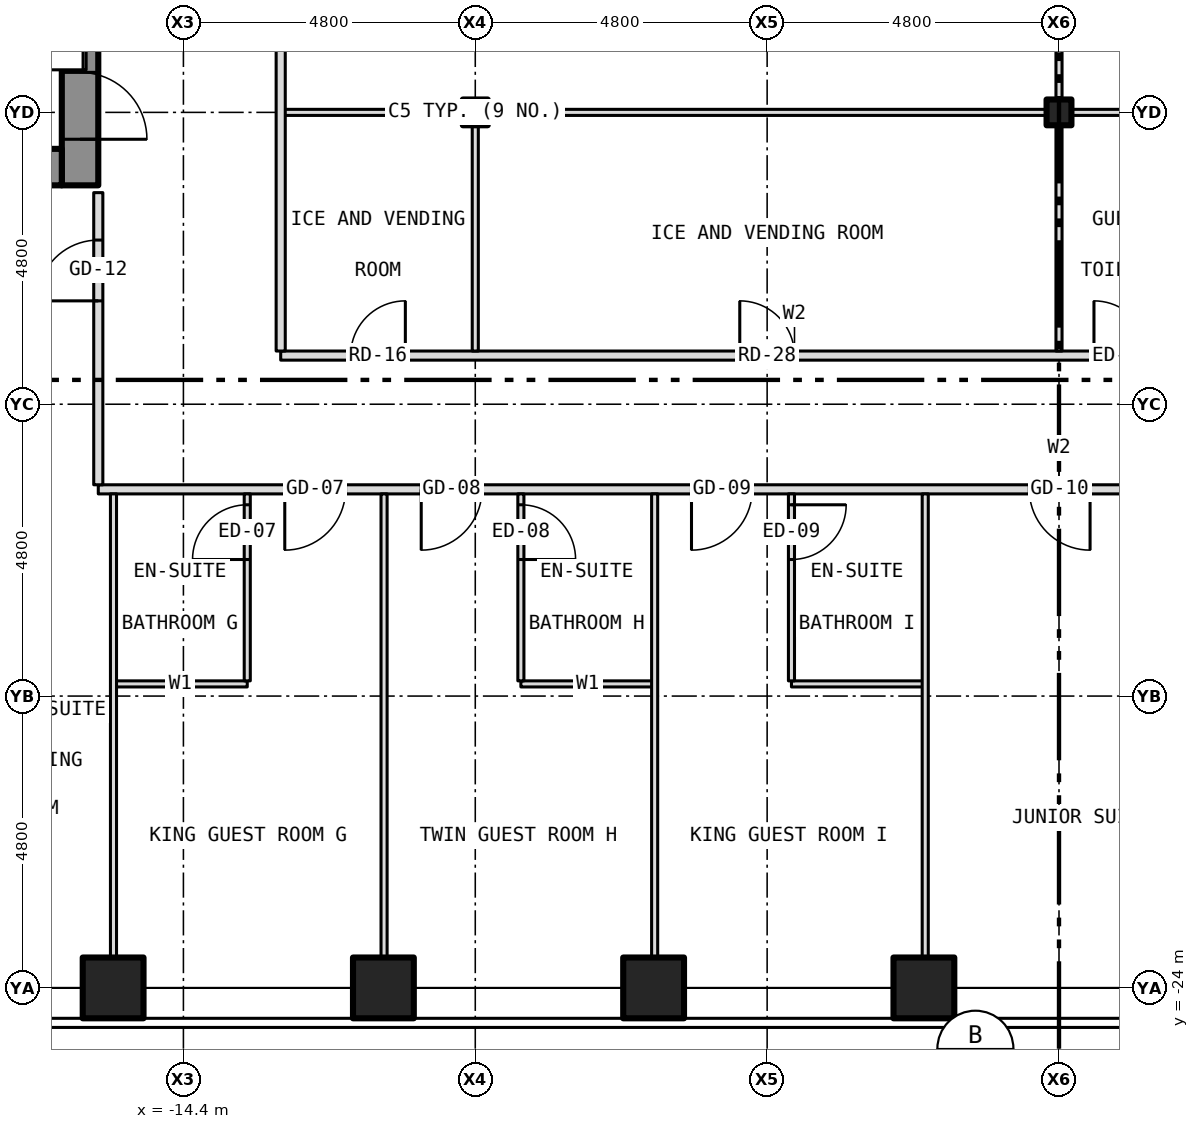
"""IFC4 building model, lengths in metres.
Left out: names, types, materials, properties, quantities, classifications, styles, units other than length and angle.
Written with IfcOpenShell. Run it as: python <this file> out.ifc"""

import sys

from ifc_helpers import new_model, si_unit, direction, frame, frame_2d, origin, origin_2d, place, context, subcontext, project, spatial, rectangle, hollow_rectangle, i_section, extrude, element, fill, save


model = new_model("IFC4")
c1 = context("Model", 3, precision=1e-05, world=origin(), true_north=direction((0.0, 1.0)))
c2 = subcontext(c1, "Body", "Model", "MODEL_VIEW")
j1 = project(units=[si_unit("LENGTHUNIT", "METRE"), si_unit("PLANEANGLEUNIT", "RADIAN")], contexts=[c1])
p1 = place(None, origin())
s1 = spatial("IfcSite", under=j1, at=p1, CompositionType="ELEMENT")
p2 = place(p1, origin())
s2 = spatial("IfcBuilding", under=s1, at=p2, CompositionType="ELEMENT")
p3 = place(p2, frame((0.0, 0.0, 53.0)))
s3 = spatial("IfcBuildingStorey", under=s2, at=p3, CompositionType="ELEMENT", Elevation=53.0)
for number, where, z_axis, x_axis in (
    (1, (-15.556, -24.0, -0.15), (0.0, 0.0, 1.0), (1.0, 0.0, 0.0)),
    (2, (-11.111, -24.0, -0.15), (0.0, 0.0, 1.0), (1.0, 0.0, 0.0)),
    (3, (-6.667, -24.0, -0.15), (0.0, 0.0, 1.0), (1.0, 0.0, 0.0)),
    (4, (-2.222, -24.0, -0.15), (0.0, 0.0, 1.0), (1.0, 0.0, 0.0)),
):
    element("IfcColumn", number, at=place(p3, frame(where, z_axis=z_axis, x_axis=x_axis)), inside=s3, PredefinedType="COLUMN", context=c2, shape_type="SweptSolid", body=[
        extrude(hollow_rectangle(XDim=1.0, YDim=1.0, WallThickness=0.06, at=origin_2d()), origin(), (0.0, 0.0, 1.0), 3.5),
    ])
for number, where, z_axis, x_axis in (
    (5, (-9.6, -9.6, -0.15), (0.0, 0.0, 1.0), (1.0, 0.0, 0.0)),
    (6, (0.0, -9.6, -0.15), (0.0, 0.0, 1.0), (1.0, 0.0, 0.0)),
):
    element("IfcColumn", number, at=place(p3, frame(where, z_axis=z_axis, x_axis=x_axis)), inside=s3, PredefinedType="COLUMN", context=c2, shape_type="SweptSolid", body=[
        extrude(i_section(OverallWidth=0.409, OverallDepth=0.424, WebThickness=0.033, FlangeThickness=0.052, at=origin_2d()), origin(), (0.0, 0.0, 1.0), 3.5),
    ])
p4 = place(p3, frame((-16.1, -10.8, 0.0), z_axis=(0.0, 0.0, 1.0), x_axis=(0.0, 1.0, 0.0)))
e7 = element("IfcWall", 7, at=p4, inside=s3, PredefinedType="SHEAR", context=c2, shape_type="SweptSolid", body=[
    extrude(rectangle(XDim=21.6, YDim=0.6, at=frame_2d((10.8, 0.0))), origin(), (0.0, 0.0, 1.0), 3.25),
])
p5 = place(p4, frame((9.4, 0.0, 0.0)))
e8 = element("IfcOpeningElement", 8, at=p5, cuts=e7, PredefinedType="OPENING", context=c2, shape_type="SweptSolid", body=[
    extrude(rectangle(XDim=1.1, YDim=2.1, at=frame_2d((0.55, 1.05))), frame((0.0, 0.312, 0.0), z_axis=(0.0, -1.0, 0.0), x_axis=(1.0, 0.0, 0.0)), (0.0, 0.0, 1.0), 0.624),
])
p6 = place(p4, frame((11.5, 0.0, 0.0)))
e9 = element("IfcOpeningElement", 9, at=p6, cuts=e7, PredefinedType="OPENING", context=c2, shape_type="SweptSolid", body=[
    extrude(rectangle(XDim=1.1, YDim=2.1, at=frame_2d((0.55, 1.05))), frame((0.0, 0.312, 0.0), z_axis=(0.0, -1.0, 0.0), x_axis=(1.0, 0.0, 0.0)), (0.0, 0.0, 1.0), 0.624),
])
p7 = place(p4, frame((13.6, 0.0, 0.0)))
e10 = element("IfcOpeningElement", 10, at=p7, cuts=e7, PredefinedType="OPENING", context=c2, shape_type="SweptSolid", body=[
    extrude(rectangle(XDim=1.1, YDim=2.1, at=frame_2d((0.55, 1.05))), frame((0.0, 0.312, 0.0), z_axis=(0.0, -1.0, 0.0), x_axis=(1.0, 0.0, 0.0)), (0.0, 0.0, 1.0), 0.624),
])
p8 = place(p4, frame((15.7, 0.0, 0.0)))
e11 = element("IfcOpeningElement", 11, at=p8, cuts=e7, PredefinedType="OPENING", context=c2, shape_type="SweptSolid", body=[
    extrude(rectangle(XDim=1.1, YDim=2.1, at=frame_2d((0.55, 1.05))), frame((0.0, 0.312, 0.0), z_axis=(0.0, -1.0, 0.0), x_axis=(1.0, 0.0, 0.0)), (0.0, 0.0, 1.0), 0.624),
])
p9 = place(p4, frame((17.8, 0.0, 0.0)))
e12 = element("IfcOpeningElement", 12, at=p9, cuts=e7, PredefinedType="OPENING", context=c2, shape_type="SweptSolid", body=[
    extrude(rectangle(XDim=1.1, YDim=2.1, at=frame_2d((0.55, 1.05))), frame((0.0, 0.312, 0.0), z_axis=(0.0, -1.0, 0.0), x_axis=(1.0, 0.0, 0.0)), (0.0, 0.0, 1.0), 0.624),
])
p10 = place(p4, frame((0.758, 0.0, 0.0)))
e13 = element("IfcOpeningElement", 13, at=p10, cuts=e7, PredefinedType="OPENING", context=c2, shape_type="SweptSolid", body=[
    extrude(rectangle(XDim=1.1, YDim=2.1, at=frame_2d((0.55, 1.05))), frame((0.0, 0.312, 0.0), z_axis=(0.0, -1.0, 0.0), x_axis=(1.0, 0.0, 0.0)), (0.0, 0.0, 1.0), 0.624),
])
p11 = place(p4, frame((7.5, 0.0, 0.0)))
e14 = element("IfcOpeningElement", 14, at=p11, cuts=e7, PredefinedType="OPENING", context=c2, shape_type="SweptSolid", body=[
    extrude(rectangle(XDim=1.1, YDim=2.1, at=frame_2d((0.55, 1.05))), frame((0.0, 0.312, 0.0), z_axis=(0.0, -1.0, 0.0), x_axis=(1.0, 0.0, 0.0)), (0.0, 0.0, 1.0), 0.624),
])
p12 = place(p3, frame((-23.4, -10.5, 0.0), z_axis=(0.0, 0.0, 1.0), x_axis=(1.0, 0.0, 0.0)))
e15 = element("IfcWall", 15, at=p12, inside=s3, PredefinedType="SHEAR", context=c2, shape_type="SweptSolid", body=[
    extrude(rectangle(XDim=7.0, YDim=0.6, at=frame_2d((3.5, 0.0))), origin(), (0.0, 0.0, 1.0), 3.25),
])
p13 = place(p3, frame((-15.55, -19.0, 0.0), z_axis=(0.0, 0.0, 1.0), x_axis=(1.0, 0.0, 0.0)))
e16 = element("IfcWall", 16, at=p13, inside=s3, PredefinedType="PARTITIONING", context=c2, shape_type="SweptSolid", body=[
    extrude(rectangle(XDim=2.2, YDim=0.1, at=frame_2d((1.1, 0.0))), origin(), (0.0, 0.0, 1.0), 3.35),
])
p14 = place(p3, frame((-8.85, -19.0, 0.0), z_axis=(0.0, 0.0, 1.0), x_axis=(1.0, 0.0, 0.0)))
e17 = element("IfcWall", 17, at=p14, inside=s3, PredefinedType="PARTITIONING", context=c2, shape_type="SweptSolid", body=[
    extrude(rectangle(XDim=2.2, YDim=0.1, at=frame_2d((1.1, 0.0))), origin(), (0.0, 0.0, 1.0), 3.35),
])
p15 = place(p3, frame((-4.4, -19.0, 0.0), z_axis=(0.0, 0.0, 1.0), x_axis=(1.0, 0.0, 0.0)))
e18 = element("IfcWall", 18, at=p15, inside=s3, PredefinedType="PARTITIONING", context=c2, shape_type="SweptSolid", body=[
    extrude(rectangle(XDim=2.2, YDim=0.1, at=frame_2d((1.1, 0.0))), origin(), (0.0, 0.0, 1.0), 3.35),
])
p16 = place(p3, frame((-15.8, -15.8, 0.0), z_axis=(0.0, 0.0, 1.0), x_axis=(1.0, 0.0, 0.0)))
e19 = element("IfcWall", 19, at=p16, inside=s3, PredefinedType="PARTITIONING", context=c2, shape_type="SweptSolid", body=[
    extrude(rectangle(XDim=31.6, YDim=0.15, at=frame_2d((15.8, 0.0))), origin(), (0.0, 0.0, 1.0), 3.35),
])
p17 = place(p16, frame((3.067, 0.0, 0.0)))
e20 = element("IfcOpeningElement", 20, at=p17, cuts=e19, PredefinedType="OPENING", context=c2, shape_type="SweptSolid", body=[
    extrude(rectangle(XDim=1.0, YDim=2.1, at=frame_2d((0.5, 1.05))), frame((0.0, 0.087, 0.0), z_axis=(0.0, -1.0, 0.0), x_axis=(1.0, 0.0, 0.0)), (0.0, 0.0, 1.0), 0.174),
])
p18 = place(p16, frame((5.311, 0.0, 0.0)))
e21 = element("IfcOpeningElement", 21, at=p18, cuts=e19, PredefinedType="OPENING", context=c2, shape_type="SweptSolid", body=[
    extrude(rectangle(XDim=1.0, YDim=2.1, at=frame_2d((0.5, 1.05))), frame((0.0, 0.087, 0.0), z_axis=(0.0, -1.0, 0.0), x_axis=(1.0, 0.0, 0.0)), (0.0, 0.0, 1.0), 0.174),
])
p19 = place(p16, frame((9.756, 0.0, 0.0)))
e22 = element("IfcOpeningElement", 22, at=p19, cuts=e19, PredefinedType="OPENING", context=c2, shape_type="SweptSolid", body=[
    extrude(rectangle(XDim=1.0, YDim=2.1, at=frame_2d((0.5, 1.05))), frame((0.0, 0.087, 0.0), z_axis=(0.0, -1.0, 0.0), x_axis=(1.0, 0.0, 0.0)), (0.0, 0.0, 1.0), 0.174),
])
p20 = place(p16, frame((15.311, 0.0, 0.0)))
e23 = element("IfcOpeningElement", 23, at=p20, cuts=e19, PredefinedType="OPENING", context=c2, shape_type="SweptSolid", body=[
    extrude(rectangle(XDim=1.0, YDim=2.1, at=frame_2d((0.5, 1.05))), frame((0.0, 0.087, 0.0), z_axis=(0.0, -1.0, 0.0), x_axis=(1.0, 0.0, 0.0)), (0.0, 0.0, 1.0), 0.174),
])
p21 = place(p16, frame((22.245, 0.0, 0.0)))
e24 = element("IfcOpeningElement", 24, at=p21, cuts=e19, PredefinedType="OPENING", context=c2, shape_type="SweptSolid", body=[
    extrude(rectangle(XDim=1.0, YDim=2.1, at=frame_2d((0.5, 1.05))), frame((0.0, 0.087, 0.0), z_axis=(0.0, -1.0, 0.0), x_axis=(1.0, 0.0, 0.0)), (0.0, 0.0, 1.0), 0.174),
])
p22 = place(p3, frame((-12.8, -13.6, 0.0), z_axis=(0.0, 0.0, 1.0), x_axis=(1.0, 0.0, 0.0)))
e25 = element("IfcWall", 25, at=p22, inside=s3, PredefinedType="PARTITIONING", context=c2, shape_type="SweptSolid", body=[
    extrude(rectangle(XDim=16.9, YDim=0.15, at=frame_2d((8.45, 0.0))), origin(), (0.0, 0.0, 1.0), 3.35),
])
p23 = place(p22, frame((1.15, 0.0, 0.0)))
e26 = element("IfcOpeningElement", 26, at=p23, cuts=e25, PredefinedType="OPENING", context=c2, shape_type="SweptSolid", body=[
    extrude(rectangle(XDim=0.9, YDim=2.1, at=frame_2d((0.45, 1.05))), frame((0.0, 0.087, 0.0), z_axis=(0.0, -1.0, 0.0), x_axis=(1.0, 0.0, 0.0)), (0.0, 0.0, 1.0), 0.174),
])
p24 = place(p22, frame((13.375, 0.0, 0.0)))
e27 = element("IfcOpeningElement", 27, at=p24, cuts=e25, PredefinedType="OPENING", context=c2, shape_type="SweptSolid", body=[
    extrude(rectangle(XDim=0.9, YDim=2.1, at=frame_2d((0.45, 1.05))), frame((0.0, 0.087, 0.0), z_axis=(0.0, -1.0, 0.0), x_axis=(1.0, 0.0, 0.0)), (0.0, 0.0, 1.0), 0.174),
])
p25 = place(p22, frame((7.55, 0.0, 0.0)))
e28 = element("IfcOpeningElement", 28, at=p25, cuts=e25, PredefinedType="OPENING", context=c2, shape_type="SweptSolid", body=[
    extrude(rectangle(XDim=0.9, YDim=2.1, at=frame_2d((0.45, 1.05))), frame((0.0, 0.087, 0.0), z_axis=(0.0, -1.0, 0.0), x_axis=(1.0, 0.0, 0.0)), (0.0, 0.0, 1.0), 0.174),
])
p26 = place(p3, frame((-12.8, -9.6, 0.0), z_axis=(0.0, 0.0, 1.0), x_axis=(1.0, 0.0, 0.0)))
e29 = element("IfcWall", 29, at=p26, inside=s3, PredefinedType="PARTITIONING", context=c2, shape_type="SweptSolid", body=[
    extrude(rectangle(XDim=2.996, YDim=0.1, at=frame_2d((1.498, 0.0))), origin(), (0.0, 0.0, 1.0), 2.728),
])
p27 = place(p3, frame((-9.804, -9.6, 0.0), z_axis=(0.0, 0.0, 1.0), x_axis=(1.0, 0.0, 0.0)))
e30 = element("IfcWall", 30, at=p27, inside=s3, PredefinedType="PARTITIONING", context=c2, shape_type="SweptSolid", body=[
    extrude(rectangle(XDim=0.408, YDim=0.1, at=frame_2d((0.204, 0.0))), origin(), (0.0, 0.0, 1.0), 3.35),
])
p28 = place(p3, frame((-9.396, -9.6, 0.0), z_axis=(0.0, 0.0, 1.0), x_axis=(1.0, 0.0, 0.0)))
e31 = element("IfcWall", 31, at=p28, inside=s3, PredefinedType="PARTITIONING", context=c2, shape_type="SweptSolid", body=[
    extrude(rectangle(XDim=9.192, YDim=0.1, at=frame_2d((4.596, 0.0))), origin(), (0.0, 0.0, 1.0), 2.728),
])
p29 = place(p3, frame((-0.204, -9.6, 0.0), z_axis=(0.0, 0.0, 1.0), x_axis=(1.0, 0.0, 0.0)))
e32 = element("IfcWall", 32, at=p29, inside=s3, PredefinedType="PARTITIONING", context=c2, shape_type="SweptSolid", body=[
    extrude(rectangle(XDim=0.408, YDim=0.1, at=frame_2d((0.204, 0.0))), origin(), (0.0, 0.0, 1.0), 3.35),
])
p30 = place(p3, frame((0.204, -9.6, 0.0), z_axis=(0.0, 0.0, 1.0), x_axis=(1.0, 0.0, 0.0)))
e33 = element("IfcWall", 33, at=p30, inside=s3, PredefinedType="PARTITIONING", context=c2, shape_type="SweptSolid", body=[
    extrude(rectangle(XDim=3.896, YDim=0.1, at=frame_2d((1.948, 0.0))), origin(), (0.0, 0.0, 1.0), 2.728),
])
p31 = place(p3, frame((-15.8, -15.725, 0.0), z_axis=(0.0, 0.0, 1.0), x_axis=(0.0, 1.0, 0.0)))
e34 = element("IfcWall", 34, at=p31, inside=s3, PredefinedType="PARTITIONING", context=c2, shape_type="SweptSolid", body=[
    extrude(rectangle(XDim=4.805, YDim=0.15, at=frame_2d((2.403, 0.0))), origin(), (0.0, 0.0, 1.0), 3.35),
])
p32 = place(p31, frame((3.025, 0.0, 0.0)))
e35 = element("IfcOpeningElement", 35, at=p32, cuts=e34, PredefinedType="OPENING", context=c2, shape_type="SweptSolid", body=[
    extrude(rectangle(XDim=1.0, YDim=2.1, at=frame_2d((0.5, 1.05))), frame((0.0, 0.087, 0.0), z_axis=(0.0, -1.0, 0.0), x_axis=(1.0, 0.0, 0.0)), (0.0, 0.0, 1.0), 0.174),
])
p33 = place(p3, frame((-15.55, -23.88, 0.0), z_axis=(0.0, 0.0, 1.0), x_axis=(0.0, 1.0, 0.0)))
e36 = element("IfcWall", 36, at=p33, inside=s3, PredefinedType="PARTITIONING", context=c2, shape_type="SweptSolid", body=[
    extrude(rectangle(XDim=8.005, YDim=0.1, at=frame_2d((4.002, 0.0))), origin(), (0.0, 0.0, 1.0), 3.35),
])
p34 = place(p3, frame((-13.35, -18.95, 0.0), z_axis=(0.0, 0.0, 1.0), x_axis=(0.0, 1.0, 0.0)))
e37 = element("IfcWall", 37, at=p34, inside=s3, PredefinedType="PARTITIONING", context=c2, shape_type="SweptSolid", body=[
    extrude(rectangle(XDim=3.075, YDim=0.1, at=frame_2d((1.538, 0.0))), origin(), (0.0, 0.0, 1.0), 3.35),
])
p35 = place(p34, frame((1.996, 0.0, 0.0)))
e38 = element("IfcOpeningElement", 38, at=p35, cuts=e37, PredefinedType="OPENING", context=c2, shape_type="SweptSolid", body=[
    extrude(rectangle(XDim=0.9, YDim=2.1, at=frame_2d((0.45, 1.05))), frame((0.0, 0.062, 0.0), z_axis=(0.0, -1.0, 0.0), x_axis=(1.0, 0.0, 0.0)), (0.0, 0.0, 1.0), 0.124),
])
p36 = place(p3, frame((-12.8, -13.525, 0.0), z_axis=(0.0, 0.0, 1.0), x_axis=(0.0, 1.0, 0.0)))
e39 = element("IfcWall", 39, at=p36, inside=s3, PredefinedType="PARTITIONING", context=c2, shape_type="SweptSolid", body=[
    extrude(rectangle(XDim=11.525, YDim=0.15, at=frame_2d((5.762, 0.0))), origin(), (0.0, 0.0, 1.0), 3.35),
])
p37 = place(p36, frame((7.325, 0.0, 0.0)))
e40 = element("IfcOpeningElement", 40, at=p37, cuts=e39, PredefinedType="OPENING", context=c2, shape_type="SweptSolid", body=[
    extrude(rectangle(XDim=0.9, YDim=2.1, at=frame_2d((0.45, 1.05))), frame((0.0, 0.087, 0.0), z_axis=(0.0, -1.0, 0.0), x_axis=(1.0, 0.0, 0.0)), (0.0, 0.0, 1.0), 0.174),
])
p38 = place(p3, frame((-11.1, -23.88, 0.0), z_axis=(0.0, 0.0, 1.0), x_axis=(0.0, 1.0, 0.0)))
e41 = element("IfcWall", 41, at=p38, inside=s3, PredefinedType="PARTITIONING", context=c2, shape_type="SweptSolid", body=[
    extrude(rectangle(XDim=8.005, YDim=0.1, at=frame_2d((4.002, 0.0))), origin(), (0.0, 0.0, 1.0), 3.35),
])
p39 = place(p3, frame((-9.6, -13.525, 0.0), z_axis=(0.0, 0.0, 1.0), x_axis=(0.0, 1.0, 0.0)))
e42 = element("IfcWall", 42, at=p39, inside=s3, PredefinedType="PARTITIONING", context=c2, shape_type="SweptSolid", body=[
    extrude(rectangle(XDim=3.875, YDim=0.1, at=frame_2d((1.938, 0.0))), origin(), (0.0, 0.0, 1.0), 2.728),
])
p40 = place(p3, frame((-8.85, -18.95, 0.0), z_axis=(0.0, 0.0, 1.0), x_axis=(0.0, 1.0, 0.0)))
e43 = element("IfcWall", 43, at=p40, inside=s3, PredefinedType="PARTITIONING", context=c2, shape_type="SweptSolid", body=[
    extrude(rectangle(XDim=3.075, YDim=0.1, at=frame_2d((1.538, 0.0))), origin(), (0.0, 0.0, 1.0), 3.35),
])
p41 = place(p40, frame((1.996, 0.0, 0.0)))
e44 = element("IfcOpeningElement", 44, at=p41, cuts=e43, PredefinedType="OPENING", context=c2, shape_type="SweptSolid", body=[
    extrude(rectangle(XDim=0.9, YDim=2.1, at=frame_2d((0.45, 1.05))), frame((0.0, 0.062, 0.0), z_axis=(0.0, -1.0, 0.0), x_axis=(1.0, 0.0, 0.0)), (0.0, 0.0, 1.0), 0.124),
])
p42 = place(p3, frame((-6.65, -23.88, 0.0), z_axis=(0.0, 0.0, 1.0), x_axis=(0.0, 1.0, 0.0)))
e45 = element("IfcWall", 45, at=p42, inside=s3, PredefinedType="PARTITIONING", context=c2, shape_type="SweptSolid", body=[
    extrude(rectangle(XDim=8.005, YDim=0.1, at=frame_2d((4.002, 0.0))), origin(), (0.0, 0.0, 1.0), 3.35),
])
p43 = place(p3, frame((-4.4, -18.95, 0.0), z_axis=(0.0, 0.0, 1.0), x_axis=(0.0, 1.0, 0.0)))
e46 = element("IfcWall", 46, at=p43, inside=s3, PredefinedType="PARTITIONING", context=c2, shape_type="SweptSolid", body=[
    extrude(rectangle(XDim=3.075, YDim=0.1, at=frame_2d((1.538, 0.0))), origin(), (0.0, 0.0, 1.0), 3.35),
])
p44 = place(p43, frame((1.996, 0.0, 0.0)))
e47 = element("IfcOpeningElement", 47, at=p44, cuts=e46, PredefinedType="OPENING", context=c2, shape_type="SweptSolid", body=[
    extrude(rectangle(XDim=0.9, YDim=2.1, at=frame_2d((0.45, 1.05))), frame((0.0, 0.062, 0.0), z_axis=(0.0, -1.0, 0.0), x_axis=(1.0, 0.0, 0.0)), (0.0, 0.0, 1.0), 0.124),
])
p45 = place(p3, frame((-2.2, -23.88, 0.0), z_axis=(0.0, 0.0, 1.0), x_axis=(0.0, 1.0, 0.0)))
e48 = element("IfcWall", 48, at=p45, inside=s3, PredefinedType="PARTITIONING", context=c2, shape_type="SweptSolid", body=[
    extrude(rectangle(XDim=8.005, YDim=0.1, at=frame_2d((4.002, 0.0))), origin(), (0.0, 0.0, 1.0), 3.35),
])
p46 = place(p3, frame((0.0, -13.525, 0.0), z_axis=(0.0, 0.0, 1.0), x_axis=(0.0, 1.0, 0.0)))
e49 = element("IfcWall", 49, at=p46, inside=s3, PredefinedType="PARTITIONING", context=c2, shape_type="SweptSolid", body=[
    extrude(rectangle(XDim=3.875, YDim=0.1, at=frame_2d((1.938, 0.0))), origin(), (0.0, 0.0, 1.0), 2.728),
])
p47 = place(p3, frame((0.0, -9.55, 0.0), z_axis=(0.0, 0.0, 1.0), x_axis=(0.0, 1.0, 0.0)))
e50 = element("IfcWall", 50, at=p47, inside=s3, PredefinedType="PARTITIONING", context=c2, shape_type="SweptSolid", body=[
    extrude(rectangle(XDim=9.5, YDim=0.1, at=frame_2d((4.75, 0.0))), origin(), (0.0, 0.0, 1.0), 2.728),
])
p48 = place(p10, origin())
e51 = element("IfcDoor", 51, at=p48, inside=s3, OperationType="SINGLE_SWING_LEFT", PredefinedType="DOOR", context=c2, shape_type="SweptSolid", body=[
    extrude(rectangle(XDim=1.1, YDim=2.1, at=frame_2d((0.55, 1.05))), frame((0.0, 0.025, 0.0), z_axis=(0.0, -1.0, 0.0), x_axis=(1.0, 0.0, 0.0)), (0.0, 0.0, 1.0), 0.05),
])
fill(e13, e51)
p49 = place(p17, origin())
e52 = element("IfcDoor", 52, at=p49, inside=s3, OperationType="SINGLE_SWING_LEFT", PredefinedType="DOOR", context=c2, shape_type="SweptSolid", body=[
    extrude(rectangle(XDim=1.0, YDim=2.1, at=frame_2d((0.5, 1.05))), frame((0.0, 0.025, 0.0), z_axis=(0.0, -1.0, 0.0), x_axis=(1.0, 0.0, 0.0)), (0.0, 0.0, 1.0), 0.05),
])
fill(e20, e52)
p50 = place(p35, origin())
e53 = element("IfcDoor", 53, at=p50, inside=s3, OperationType="SINGLE_SWING_LEFT", PredefinedType="DOOR", context=c2, shape_type="SweptSolid", body=[
    extrude(rectangle(XDim=0.9, YDim=2.1, at=frame_2d((0.45, 1.05))), frame((0.0, 0.025, 0.0), z_axis=(0.0, -1.0, 0.0), x_axis=(1.0, 0.0, 0.0)), (0.0, 0.0, 1.0), 0.05),
])
fill(e38, e53)
p51 = place(p18, origin())
e54 = element("IfcDoor", 54, at=p51, inside=s3, OperationType="SINGLE_SWING_LEFT", PredefinedType="DOOR", context=c2, shape_type="SweptSolid", body=[
    extrude(rectangle(XDim=1.0, YDim=2.1, at=frame_2d((0.5, 1.05))), frame((0.0, 0.025, 0.0), z_axis=(0.0, -1.0, 0.0), x_axis=(1.0, 0.0, 0.0)), (0.0, 0.0, 1.0), 0.05),
])
fill(e21, e54)
p52 = place(p41, origin())
e55 = element("IfcDoor", 55, at=p52, inside=s3, OperationType="SINGLE_SWING_LEFT", PredefinedType="DOOR", context=c2, shape_type="SweptSolid", body=[
    extrude(rectangle(XDim=0.9, YDim=2.1, at=frame_2d((0.45, 1.05))), frame((0.0, 0.025, 0.0), z_axis=(0.0, -1.0, 0.0), x_axis=(1.0, 0.0, 0.0)), (0.0, 0.0, 1.0), 0.05),
])
fill(e44, e55)
p53 = place(p19, origin())
e56 = element("IfcDoor", 56, at=p53, inside=s3, OperationType="SINGLE_SWING_LEFT", PredefinedType="DOOR", context=c2, shape_type="SweptSolid", body=[
    extrude(rectangle(XDim=1.0, YDim=2.1, at=frame_2d((0.5, 1.05))), frame((0.0, 0.025, 0.0), z_axis=(0.0, -1.0, 0.0), x_axis=(1.0, 0.0, 0.0)), (0.0, 0.0, 1.0), 0.05),
])
fill(e22, e56)
p54 = place(p44, origin())
e57 = element("IfcDoor", 57, at=p54, inside=s3, OperationType="SINGLE_SWING_RIGHT", PredefinedType="DOOR", context=c2, shape_type="SweptSolid", body=[
    extrude(rectangle(XDim=0.9, YDim=2.1, at=frame_2d((0.45, 1.05))), frame((0.0, 0.025, 0.0), z_axis=(0.0, -1.0, 0.0), x_axis=(1.0, 0.0, 0.0)), (0.0, 0.0, 1.0), 0.05),
])
fill(e47, e57)
p55 = place(p20, origin())
e58 = element("IfcDoor", 58, at=p55, inside=s3, OperationType="SINGLE_SWING_RIGHT", PredefinedType="DOOR", context=c2, shape_type="SweptSolid", body=[
    extrude(rectangle(XDim=1.0, YDim=2.1, at=frame_2d((0.5, 1.05))), frame((0.0, 0.025, 0.0), z_axis=(0.0, -1.0, 0.0), x_axis=(1.0, 0.0, 0.0)), (0.0, 0.0, 1.0), 0.05),
])
fill(e23, e58)
p56 = place(p32, origin())
e59 = element("IfcDoor", 59, at=p56, inside=s3, OperationType="SINGLE_SWING_LEFT", PredefinedType="DOOR", context=c2, shape_type="SweptSolid", body=[
    extrude(rectangle(XDim=1.0, YDim=2.1, at=frame_2d((0.5, 1.05))), frame((0.0, 0.025, 0.0), z_axis=(0.0, -1.0, 0.0), x_axis=(1.0, 0.0, 0.0)), (0.0, 0.0, 1.0), 0.05),
])
fill(e35, e59)
p57 = place(p23, origin())
e60 = element("IfcDoor", 60, at=p57, inside=s3, OperationType="SINGLE_SWING_RIGHT", PredefinedType="DOOR", context=c2, shape_type="SweptSolid", body=[
    extrude(rectangle(XDim=0.9, YDim=2.1, at=frame_2d((0.45, 1.05))), frame((0.0, 0.025, 0.0), z_axis=(0.0, -1.0, 0.0), x_axis=(1.0, 0.0, 0.0)), (0.0, 0.0, 1.0), 0.05),
])
fill(e26, e60)
p58 = place(p24, origin())
e61 = element("IfcDoor", 61, at=p58, inside=s3, OperationType="SINGLE_SWING_LEFT", PredefinedType="DOOR", context=c2, shape_type="SweptSolid", body=[
    extrude(rectangle(XDim=0.9, YDim=2.1, at=frame_2d((0.45, 1.05))), frame((0.0, 0.025, 0.0), z_axis=(0.0, -1.0, 0.0), x_axis=(1.0, 0.0, 0.0)), (0.0, 0.0, 1.0), 0.05),
])
fill(e27, e61)
p59 = place(p25, origin())
e62 = element("IfcDoor", 62, at=p59, inside=s3, OperationType="SINGLE_SWING_LEFT", PredefinedType="DOOR", context=c2, shape_type="SweptSolid", body=[
    extrude(rectangle(XDim=0.9, YDim=2.1, at=frame_2d((0.45, 1.05))), frame((0.0, 0.025, 0.0), z_axis=(0.0, -1.0, 0.0), x_axis=(1.0, 0.0, 0.0)), (0.0, 0.0, 1.0), 0.05),
])
fill(e28, e62)
save(model, sys.argv[1])
